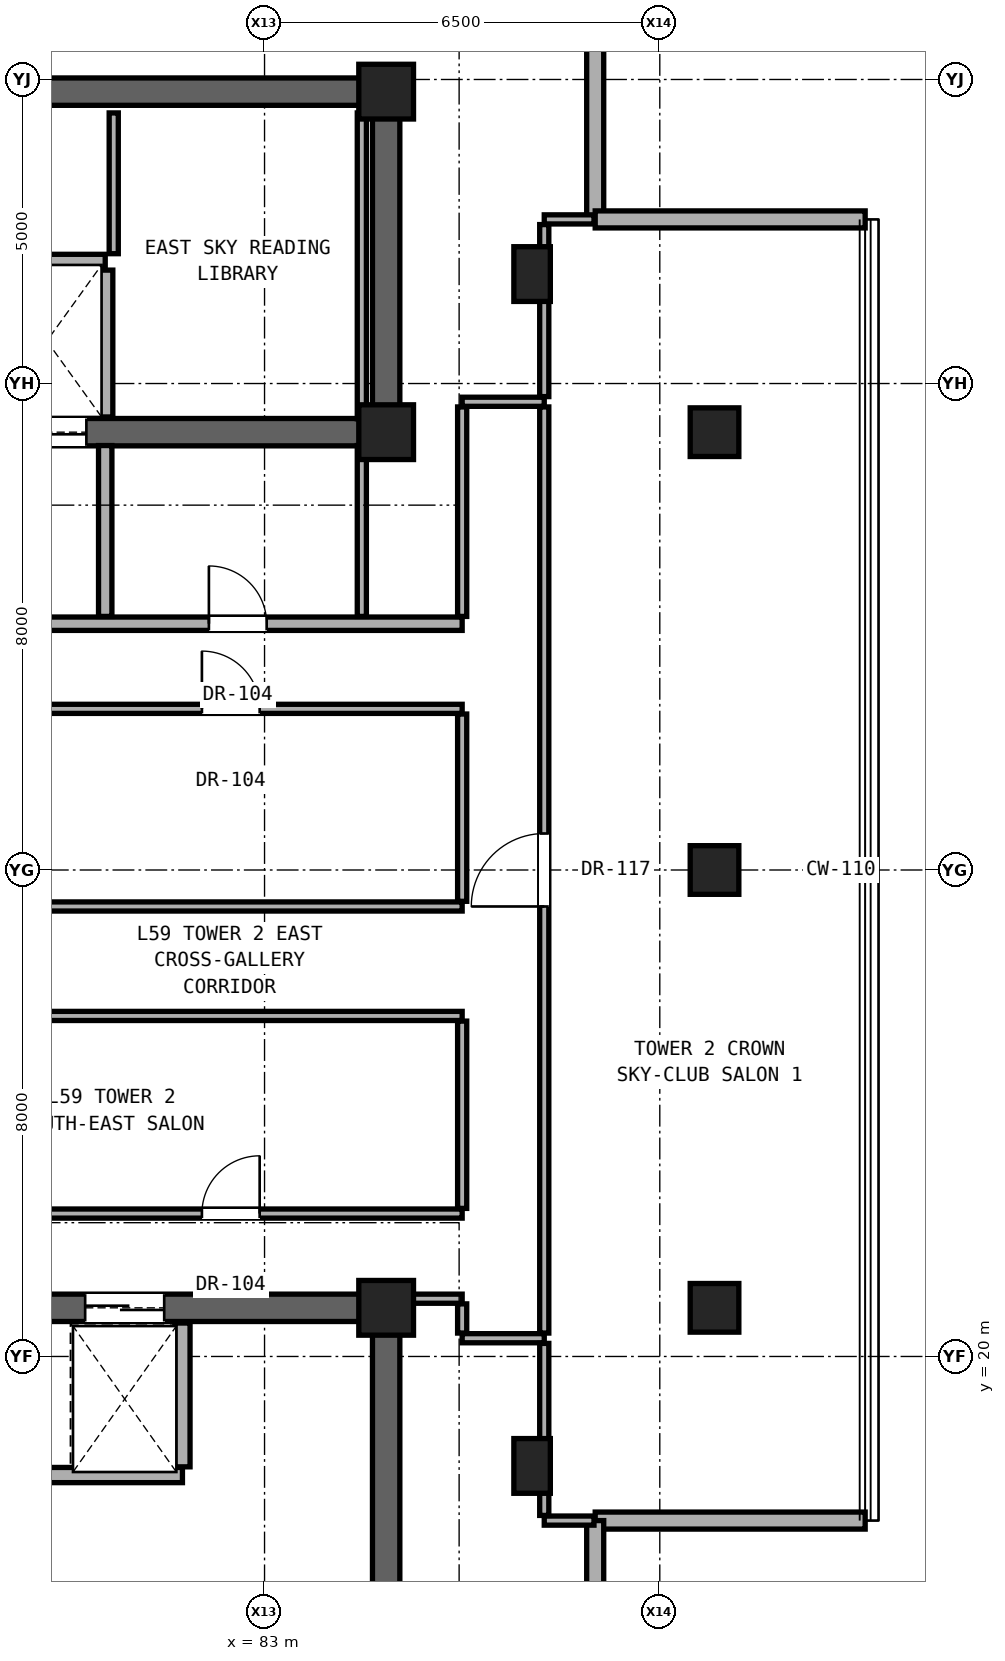
"""IFC4 building model, lengths in metres.
Left out: names, types, materials, properties, quantities, classifications, styles, units other than length and angle.
Written with IfcOpenShell. Run it as: python <this file> out.ifc"""

import sys

from ifc_helpers import new_model, si_unit, direction, frame, frame_2d, origin, origin_2d, place, context, subcontext, project, spatial, rectangle, hollow_rectangle, extrude, element, fill, save


model = new_model("IFC4")
c1 = context("Model", 3, precision=1e-05, world=origin(), true_north=direction((0.0, 1.0)))
c2 = subcontext(c1, "Body", "Model", "MODEL_VIEW")
j1 = project(units=[si_unit("LENGTHUNIT", "METRE"), si_unit("PLANEANGLEUNIT", "RADIAN")], contexts=[c1])
p1 = place(None, origin())
s1 = spatial("IfcSite", under=j1, at=p1, CompositionType="ELEMENT")
p2 = place(p1, origin())
s2 = spatial("IfcBuilding", under=s1, at=p2, CompositionType="ELEMENT")
p3 = place(p2, frame((0.0, 0.0, 206.4)))
s3 = spatial("IfcBuildingStorey", under=s2, at=p3, CompositionType="ELEMENT", Elevation=206.4)
for number, where, z_axis, x_axis in (
    (1, (85.0, 20.8, 0.0), (0.0, 0.0, 1.0), (1.0, 0.0, 0.0)),
    (2, (85.0, 35.2, 0.0), (0.0, 0.0, 1.0), (1.0, 0.0, 0.0)),
    (3, (85.0, 40.8, 0.0), (0.0, 0.0, 1.0), (1.0, 0.0, 0.0)),
):
    element("IfcColumn", number, at=place(p3, frame(where, z_axis=z_axis, x_axis=x_axis)), inside=s3, PredefinedType="COLUMN", context=c2, shape_type="SweptSolid", body=[
        extrude(rectangle(XDim=0.9, YDim=0.9, at=origin_2d()), origin(), (0.0, 0.0, 1.0), 3.25),
    ])
for number, where, z_axis, x_axis in (
    (4, (90.4, 20.8, 0.0), (0.0, 0.0, 1.0), (1.0, 0.0, 0.0)),
    (5, (90.4, 28.0, 0.0), (0.0, 0.0, 1.0), (1.0, 0.0, 0.0)),
    (6, (90.4, 35.2, 0.0), (0.0, 0.0, 1.0), (1.0, 0.0, 0.0)),
):
    element("IfcColumn", number, at=place(p3, frame(where, z_axis=z_axis, x_axis=x_axis)), inside=s3, PredefinedType="COLUMN", context=c2, shape_type="SweptSolid", body=[
        extrude(hollow_rectangle(XDim=0.8, YDim=0.8, WallThickness=0.045, at=origin_2d()), origin(), (0.0, 0.0, 1.0), 3.25),
    ])
for number, where, z_axis, x_axis in (
    (7, (87.4, 18.2, 0.0), (0.0, 0.0, 1.0), (1.0, 0.0, 0.0)),
    (8, (87.4, 37.8, 0.0), (0.0, 0.0, 1.0), (1.0, 0.0, 0.0)),
):
    element("IfcColumn", number, at=place(p3, frame(where, z_axis=z_axis, x_axis=x_axis)), inside=s3, PredefinedType="PILASTER", context=c2, shape_type="SweptSolid", body=[
        extrude(rectangle(XDim=0.6, YDim=0.9, at=origin_2d()), origin(), (0.0, 0.0, 1.0), 3.25),
    ])
p4 = place(p3, frame((68.0, 40.8, 0.0), z_axis=(0.0, 0.0, 1.0), x_axis=(1.0, 0.0, 0.0)))
e9 = element("IfcWall", 9, at=p4, inside=s3, PredefinedType="SHEAR", context=c2, shape_type="SweptSolid", body=[
    extrude(rectangle(XDim=17.0, YDim=0.45, at=frame_2d((8.5, 0.0))), origin(), (0.0, 0.0, 1.0), 2.6),
])
p5 = place(p3, frame((85.0, 35.2, 0.0), z_axis=(0.0, 0.0, 1.0), x_axis=(0.0, 1.0, 0.0)))
e10 = element("IfcWall", 10, at=p5, inside=s3, PredefinedType="SHEAR", context=c2, shape_type="SweptSolid", body=[
    extrude(rectangle(XDim=5.6, YDim=0.45, at=frame_2d((2.8, 0.0))), origin(), (0.0, 0.0, 1.0), 2.6),
])
p6 = place(p3, frame((68.0, 35.2, 0.0), z_axis=(0.0, 0.0, 1.0), x_axis=(1.0, 0.0, 0.0)))
e11 = element("IfcWall", 11, at=p6, inside=s3, PredefinedType="SHEAR", context=c2, shape_type="SweptSolid", body=[
    extrude(rectangle(XDim=17.0, YDim=0.45, at=frame_2d((8.5, 0.0))), origin(), (0.0, 0.0, 1.0), 2.6),
])
p7 = place(p6, frame((1.06, 0.0, 0.0)))
e12 = element("IfcOpeningElement", 12, at=p7, cuts=e11, PredefinedType="OPENING", context=c2, shape_type="SweptSolid", body=[
    extrude(rectangle(XDim=1.15, YDim=2.2, at=frame_2d((0.575, 1.1))), frame((0.0, 0.235, 0.0), z_axis=(0.0, -1.0, 0.0), x_axis=(1.0, 0.0, 0.0)), (0.0, 0.0, 1.0), 0.47),
])
p8 = place(p6, frame((8.75, 0.0, 0.0)))
e13 = element("IfcOpeningElement", 13, at=p8, cuts=e11, PredefinedType="OPENING", context=c2, shape_type="SweptSolid", body=[
    extrude(rectangle(XDim=1.4, YDim=2.35, at=frame_2d((0.7, 1.175))), frame((0.0, 0.235, 0.0), z_axis=(0.0, -1.0, 0.0), x_axis=(1.0, 0.0, 0.0)), (0.0, 0.0, 1.0), 0.47),
])
p9 = place(p6, frame((10.77, 0.0, 0.0)))
e14 = element("IfcOpeningElement", 14, at=p9, cuts=e11, PredefinedType="OPENING", context=c2, shape_type="SweptSolid", body=[
    extrude(rectangle(XDim=1.3, YDim=2.3, at=frame_2d((0.65, 1.15))), frame((0.0, 0.235, 0.0), z_axis=(0.0, -1.0, 0.0), x_axis=(1.0, 0.0, 0.0)), (0.0, 0.0, 1.0), 0.47),
])
p10 = place(p3, frame((85.0, 15.2, 0.0), z_axis=(0.0, 0.0, 1.0), x_axis=(0.0, 1.0, 0.0)))
e15 = element("IfcWall", 15, at=p10, inside=s3, PredefinedType="SHEAR", context=c2, shape_type="SweptSolid", body=[
    extrude(rectangle(XDim=5.6, YDim=0.45, at=frame_2d((2.8, 0.0))), origin(), (0.0, 0.0, 1.0), 2.6),
])
p11 = place(p3, frame((68.0, 20.8, 0.0), z_axis=(0.0, 0.0, 1.0), x_axis=(1.0, 0.0, 0.0)))
e16 = element("IfcWall", 16, at=p11, inside=s3, PredefinedType="SHEAR", context=c2, shape_type="SweptSolid", body=[
    extrude(rectangle(XDim=17.0, YDim=0.45, at=frame_2d((8.5, 0.0))), origin(), (0.0, 0.0, 1.0), 2.6),
])
p12 = place(p11, frame((4.145, 0.0, 0.0)))
e17 = element("IfcOpeningElement", 17, at=p12, cuts=e16, PredefinedType="OPENING", context=c2, shape_type="SweptSolid", body=[
    extrude(rectangle(XDim=1.2, YDim=2.25, at=frame_2d((0.6, 1.125))), frame((0.0, 0.235, 0.0), z_axis=(0.0, -1.0, 0.0), x_axis=(1.0, 0.0, 0.0)), (0.0, 0.0, 1.0), 0.47),
])
p13 = place(p11, frame((9.55, 0.0, 0.0)))
e18 = element("IfcOpeningElement", 18, at=p13, cuts=e16, PredefinedType="OPENING", context=c2, shape_type="SweptSolid", body=[
    extrude(rectangle(XDim=1.3, YDim=2.3, at=frame_2d((0.65, 1.15))), frame((0.0, 0.235, 0.0), z_axis=(0.0, -1.0, 0.0), x_axis=(1.0, 0.0, 0.0)), (0.0, 0.0, 1.0), 0.47),
])
p14 = place(p11, frame((12.05, 0.0, 0.0)))
e19 = element("IfcOpeningElement", 19, at=p14, cuts=e16, PredefinedType="OPENING", context=c2, shape_type="SweptSolid", body=[
    extrude(rectangle(XDim=1.3, YDim=2.3, at=frame_2d((0.65, 1.15))), frame((0.0, 0.235, 0.0), z_axis=(0.0, -1.0, 0.0), x_axis=(1.0, 0.0, 0.0)), (0.0, 0.0, 1.0), 0.47),
])
for number, where, z_axis, x_axis in (
    (20, (88.438, 38.699, 0.0), (0.0, 0.0, 1.0), (0.0, 1.0, 0.0)),
    (21, (88.438, 17.301, 0.0), (0.0, 0.0, 1.0), (1.0, 0.0, 0.0)),
    (22, (88.438, 12.862, 0.0), (0.0, 0.0, 1.0), (0.0, 1.0, 0.0)),
    (23, (92.877, 38.699, 0.0), (0.0, 0.0, 1.0), (-1.0, 0.0, 0.0)),
):
    element("IfcWall", number, at=place(p3, frame(where, z_axis=z_axis, x_axis=x_axis)), inside=s3, PredefinedType="SOLIDWALL", context=c2, shape_type="SweptSolid", body=[
        extrude(rectangle(XDim=4.44, YDim=0.28, at=frame_2d((2.22, 0.0))), origin(), (0.0, 0.0, 1.0), 2.58),
    ])
p15 = place(p3, frame((87.6, 17.301, 0.0), z_axis=(0.0, 0.0, 1.0), x_axis=(1.0, 0.0, 0.0)))
e24 = element("IfcWall", 24, at=p15, inside=s3, PredefinedType="PARTITIONING", context=c2, shape_type="SweptSolid", body=[
    extrude(rectangle(XDim=0.818, YDim=0.15, at=frame_2d((0.409, 0.0))), origin(), (0.0, 0.0, 1.0), 2.6),
])
p16 = place(p3, frame((77.3, 18.05, 0.0), z_axis=(0.0, 0.0, 1.0), x_axis=(1.0, 0.0, 0.0)))
e25 = element("IfcWall", 25, at=p16, inside=s3, PredefinedType="SOLIDWALL", context=c2, shape_type="SweptSolid", body=[
    extrude(rectangle(XDim=4.35, YDim=0.25, at=frame_2d((2.175, 0.0))), origin(), (0.0, 0.0, 1.0), 2.6),
])
p17 = place(p3, frame((86.25, 20.3, 0.0), z_axis=(0.0, 0.0, 1.0), x_axis=(1.0, 0.0, 0.0)))
e26 = element("IfcWall", 26, at=p17, inside=s3, PredefinedType="PARTITIONING", context=c2, shape_type="SweptSolid", body=[
    extrude(rectangle(XDim=1.35, YDim=0.15, at=frame_2d((0.675, 0.0))), origin(), (0.0, 0.0, 1.0), 2.6),
])
p18 = place(p3, frame((85.22, 20.95, 0.0), z_axis=(0.0, 0.0, 1.0), x_axis=(1.0, 0.0, 0.0)))
e27 = element("IfcWall", 27, at=p18, inside=s3, PredefinedType="PARTITIONING", context=c2, shape_type="SweptSolid", body=[
    extrude(rectangle(XDim=1.03, YDim=0.15, at=frame_2d((0.515, 0.0))), origin(), (0.0, 0.0, 1.0), 2.262),
])
p19 = place(p3, frame((78.64, 22.35, 0.0), z_axis=(0.0, 0.0, 1.0), x_axis=(1.0, 0.0, 0.0)))
e28 = element("IfcWall", 28, at=p19, inside=s3, PredefinedType="PARTITIONING", context=c2, shape_type="SweptSolid", body=[
    extrude(rectangle(XDim=7.61, YDim=0.15, at=frame_2d((3.805, 0.0))), origin(), (0.0, 0.0, 1.0), 2.175),
])
p20 = place(p19, frame((3.33, 0.0, 0.0)))
e29 = element("IfcOpeningElement", 29, at=p20, cuts=e28, PredefinedType="OPENING", context=c2, shape_type="SweptSolid", body=[
    extrude(rectangle(XDim=0.95, YDim=2.15, at=frame_2d((0.475, 1.075))), frame((0.0, 0.085, 0.0), z_axis=(0.0, -1.0, 0.0), x_axis=(1.0, 0.0, 0.0)), (0.0, 0.0, 1.0), 0.17),
])
for number, where, z_axis, x_axis in (
    (30, (78.6, 25.6, 0.0), (0.0, 0.0, 1.0), (1.0, 0.0, 0.0)),
    (31, (78.6, 27.4, 0.0), (0.0, 0.0, 1.0), (1.0, 0.0, 0.0)),
):
    element("IfcWall", number, at=place(p3, frame(where, z_axis=z_axis, x_axis=x_axis)), inside=s3, PredefinedType="PARTITIONING", context=c2, shape_type="SweptSolid", body=[
        extrude(rectangle(XDim=7.65, YDim=0.15, at=frame_2d((3.825, 0.0))), origin(), (0.0, 0.0, 1.0), 2.175),
    ])
p21 = place(p3, frame((78.64, 30.65, 0.0), z_axis=(0.0, 0.0, 1.0), x_axis=(1.0, 0.0, 0.0)))
e32 = element("IfcWall", 32, at=p21, inside=s3, PredefinedType="PARTITIONING", context=c2, shape_type="SweptSolid", body=[
    extrude(rectangle(XDim=7.61, YDim=0.15, at=frame_2d((3.805, 0.0))), origin(), (0.0, 0.0, 1.0), 2.175),
])
p22 = place(p21, frame((3.33, 0.0, 0.0)))
e33 = element("IfcOpeningElement", 33, at=p22, cuts=e32, PredefinedType="OPENING", context=c2, shape_type="SweptSolid", body=[
    extrude(rectangle(XDim=0.95, YDim=2.15, at=frame_2d((0.475, 1.075))), frame((0.0, 0.085, 0.0), z_axis=(0.0, -1.0, 0.0), x_axis=(1.0, 0.0, 0.0)), (0.0, 0.0, 1.0), 0.17),
])
p23 = place(p3, frame((71.55, 32.05, 0.0), z_axis=(0.0, 0.0, 1.0), x_axis=(1.0, 0.0, 0.0)))
e34 = element("IfcWall", 34, at=p23, inside=s3, PredefinedType="SOLIDWALL", context=c2, shape_type="SweptSolid", body=[
    extrude(rectangle(XDim=14.7, YDim=0.22, at=frame_2d((7.35, 0.0))), origin(), (0.0, 0.0, 1.0), 2.175),
])
p24 = place(p23, frame((6.065, 0.0, 0.0)))
e35 = element("IfcOpeningElement", 35, at=p24, cuts=e34, PredefinedType="OPENING", context=c2, shape_type="SweptSolid", body=[
    extrude(rectangle(XDim=0.85, YDim=2.01, at=frame_2d((0.425, 1.005))), frame((0.0, 0.12, 0.0), z_axis=(0.0, -1.0, 0.0), x_axis=(1.0, 0.0, 0.0)), (0.0, 0.0, 1.0), 0.24),
])
p25 = place(p23, frame((10.535, 0.0, 0.0)))
e36 = element("IfcOpeningElement", 36, at=p25, cuts=e34, PredefinedType="OPENING", context=c2, shape_type="SweptSolid", body=[
    extrude(rectangle(XDim=0.95, YDim=2.15, at=frame_2d((0.475, 1.075))), frame((0.0, 0.12, 0.0), z_axis=(0.0, -1.0, 0.0), x_axis=(1.0, 0.0, 0.0)), (0.0, 0.0, 1.0), 0.24),
])
p26 = place(p23, frame((1.65, 0.0, 0.0)))
e37 = element("IfcOpeningElement", 37, at=p26, cuts=e34, PredefinedType="OPENING", context=c2, shape_type="SweptSolid", body=[
    extrude(rectangle(XDim=0.85, YDim=2.01, at=frame_2d((0.425, 1.005))), frame((0.0, 0.12, 0.0), z_axis=(0.0, -1.0, 0.0), x_axis=(1.0, 0.0, 0.0)), (0.0, 0.0, 1.0), 0.24),
])
p27 = place(p3, frame((86.25, 35.7, 0.0), z_axis=(0.0, 0.0, 1.0), x_axis=(1.0, 0.0, 0.0)))
e38 = element("IfcWall", 38, at=p27, inside=s3, PredefinedType="PARTITIONING", context=c2, shape_type="SweptSolid", body=[
    extrude(rectangle(XDim=1.35, YDim=0.15, at=frame_2d((0.675, 0.0))), origin(), (0.0, 0.0, 1.0), 2.6),
])
p28 = place(p3, frame((76.72, 38.0, 0.0), z_axis=(0.0, 0.0, 1.0), x_axis=(1.0, 0.0, 0.0)))
e39 = element("IfcWall", 39, at=p28, inside=s3, PredefinedType="SOLIDWALL", context=c2, shape_type="SweptSolid", body=[
    extrude(rectangle(XDim=3.66, YDim=0.25, at=frame_2d((1.83, 0.0))), origin(), (0.0, 0.0, 1.0), 2.6),
])
p29 = place(p3, frame((87.6, 38.699, 0.0), z_axis=(0.0, 0.0, 1.0), x_axis=(1.0, 0.0, 0.0)))
e40 = element("IfcWall", 40, at=p29, inside=s3, PredefinedType="PARTITIONING", context=c2, shape_type="SweptSolid", body=[
    extrude(rectangle(XDim=0.818, YDim=0.15, at=frame_2d((0.409, 0.0))), origin(), (0.0, 0.0, 1.0), 2.6),
])
p30 = place(p3, frame((80.38, 32.17, 0.0), z_axis=(0.0, 0.0, 1.0), x_axis=(0.0, 1.0, 0.0)))
e41 = element("IfcWall", 41, at=p30, inside=s3, PredefinedType="SOLIDWALL", context=c2, shape_type="SweptSolid", body=[
    extrude(rectangle(XDim=2.81, YDim=0.22, at=frame_2d((1.405, 0.0))), origin(), (0.0, 0.0, 1.0), 2.6),
])
p31 = place(p3, frame((80.38, 35.45, 0.0), z_axis=(0.0, 0.0, 1.0), x_axis=(0.0, 1.0, 0.0)))
e42 = element("IfcWall", 42, at=p31, inside=s3, PredefinedType="SOLIDWALL", context=c2, shape_type="SweptSolid", body=[
    extrude(rectangle(XDim=2.415, YDim=0.25, at=frame_2d((1.208, 0.0))), origin(), (0.0, 0.0, 1.0), 2.6),
])
p32 = place(p3, frame((80.52, 38.135, 0.0), z_axis=(0.0, 0.0, 1.0), x_axis=(0.0, 1.0, 0.0)))
e43 = element("IfcWall", 43, at=p32, inside=s3, PredefinedType="PARTITIONING", context=c2, shape_type="SweptSolid", body=[
    extrude(rectangle(XDim=2.315, YDim=0.15, at=frame_2d((1.157, 0.0))), origin(), (0.0, 0.0, 1.0), 2.6),
])
p33 = place(p3, frame((81.65, 18.185, 0.0), z_axis=(0.0, 0.0, 1.0), x_axis=(0.0, 1.0, 0.0)))
e44 = element("IfcWall", 44, at=p33, inside=s3, PredefinedType="SOLIDWALL", context=c2, shape_type="SweptSolid", body=[
    extrude(rectangle(XDim=2.365, YDim=0.25, at=frame_2d((1.183, 0.0))), origin(), (0.0, 0.0, 1.0), 2.6),
])
p34 = place(p3, frame((84.6, 32.17, 0.0), z_axis=(0.0, 0.0, 1.0), x_axis=(0.0, 1.0, 0.0)))
e45 = element("IfcWall", 45, at=p34, inside=s3, PredefinedType="PARTITIONING", context=c2, shape_type="SweptSolid", body=[
    extrude(rectangle(XDim=2.81, YDim=0.15, at=frame_2d((1.405, 0.0))), origin(), (0.0, 0.0, 1.0), 2.6),
])
p35 = place(p3, frame((84.6, 35.42, 0.0), z_axis=(0.0, 0.0, 1.0), x_axis=(0.0, 1.0, 0.0)))
e46 = element("IfcWall", 46, at=p35, inside=s3, PredefinedType="PARTITIONING", context=c2, shape_type="SweptSolid", body=[
    extrude(rectangle(XDim=5.03, YDim=0.15, at=frame_2d((2.515, 0.0))), origin(), (0.0, 0.0, 1.0), 2.6),
])
p36 = place(p3, frame((86.25, 20.385, 0.0), z_axis=(0.0, 0.0, 1.0), x_axis=(0.0, 1.0, 0.0)))
e47 = element("IfcWall", 47, at=p36, inside=s3, PredefinedType="PARTITIONING", context=c2, shape_type="SweptSolid", body=[
    extrude(rectangle(XDim=0.48, YDim=0.15, at=frame_2d((0.24, 0.0))), origin(), (0.0, 0.0, 1.0), 2.262),
])
p37 = place(p3, frame((86.25, 22.435, 0.0), z_axis=(0.0, 0.0, 1.0), x_axis=(0.0, 1.0, 0.0)))
e48 = element("IfcWall", 48, at=p37, inside=s3, PredefinedType="PARTITIONING", context=c2, shape_type="SweptSolid", body=[
    extrude(rectangle(XDim=3.08, YDim=0.15, at=frame_2d((1.54, 0.0))), origin(), (0.0, 0.0, 1.0), 2.6),
])
p38 = place(p3, frame((86.25, 27.485, 0.0), z_axis=(0.0, 0.0, 1.0), x_axis=(0.0, 1.0, 0.0)))
e49 = element("IfcWall", 49, at=p38, inside=s3, PredefinedType="PARTITIONING", context=c2, shape_type="SweptSolid", body=[
    extrude(rectangle(XDim=3.08, YDim=0.15, at=frame_2d((1.54, 0.0))), origin(), (0.0, 0.0, 1.0), 2.262),
])
p39 = place(p3, frame((86.25, 32.17, 0.0), z_axis=(0.0, 0.0, 1.0), x_axis=(0.0, 1.0, 0.0)))
e50 = element("IfcWall", 50, at=p39, inside=s3, PredefinedType="PARTITIONING", context=c2, shape_type="SweptSolid", body=[
    extrude(rectangle(XDim=3.445, YDim=0.15, at=frame_2d((1.723, 0.0))), origin(), (0.0, 0.0, 1.0), 2.262),
])
p40 = place(p3, frame((87.6, 17.386, 0.0), z_axis=(0.0, 0.0, 1.0), x_axis=(0.0, 1.0, 0.0)))
e51 = element("IfcWall", 51, at=p40, inside=s3, PredefinedType="PARTITIONING", context=c2, shape_type="SweptSolid", body=[
    extrude(rectangle(XDim=2.829, YDim=0.15, at=frame_2d((1.415, 0.0))), origin(), (0.0, 0.0, 1.0), 2.043),
])
p41 = place(p3, frame((87.6, 20.385, 0.0), z_axis=(0.0, 0.0, 1.0), x_axis=(0.0, 1.0, 0.0)))
e52 = element("IfcWall", 52, at=p41, inside=s3, PredefinedType="PARTITIONING", context=c2, shape_type="SweptSolid", body=[
    extrude(rectangle(XDim=15.23, YDim=0.15, at=frame_2d((7.615, 0.0))), origin(), (0.0, 0.0, 1.0), 2.262),
])
p42 = place(p41, frame((7.015, 0.0, 0.0)))
e53 = element("IfcOpeningElement", 53, at=p42, cuts=e52, PredefinedType="OPENING", context=c2, shape_type="SweptSolid", body=[
    extrude(rectangle(XDim=1.2, YDim=2.25, at=frame_2d((0.6, 1.125))), frame((0.0, 0.085, 0.0), z_axis=(0.0, -1.0, 0.0), x_axis=(1.0, 0.0, 0.0)), (0.0, 0.0, 1.0), 0.17),
])
p43 = place(p3, frame((87.6, 35.785, 0.0), z_axis=(0.0, 0.0, 1.0), x_axis=(0.0, 1.0, 0.0)))
e54 = element("IfcWall", 54, at=p43, inside=s3, PredefinedType="PARTITIONING", context=c2, shape_type="SweptSolid", body=[
    extrude(rectangle(XDim=2.829, YDim=0.15, at=frame_2d((1.415, 0.0))), origin(), (0.0, 0.0, 1.0), 2.043),
])
p44 = place(p25, origin())
e55 = element("IfcDoor", 55, at=p44, inside=s3, OperationType="SINGLE_SWING_LEFT", PredefinedType="DOOR", context=c2, shape_type="SweptSolid", body=[
    extrude(rectangle(XDim=0.95, YDim=2.15, at=frame_2d((0.475, 1.075))), frame((0.0, 0.025, 0.0), z_axis=(0.0, -1.0, 0.0), x_axis=(1.0, 0.0, 0.0)), (0.0, 0.0, 1.0), 0.05),
])
fill(e36, e55)
p45 = place(p42, origin())
e56 = element("IfcDoor", 56, at=p45, inside=s3, OperationType="SINGLE_SWING_LEFT", PredefinedType="DOOR", context=c2, shape_type="SweptSolid", body=[
    extrude(rectangle(XDim=1.2, YDim=2.25, at=frame_2d((0.6, 1.125))), frame((0.0, 0.025, 0.0), z_axis=(0.0, -1.0, 0.0), x_axis=(1.0, 0.0, 0.0)), (0.0, 0.0, 1.0), 0.05),
])
fill(e53, e56)
p46 = place(p20, origin())
e57 = element("IfcDoor", 57, at=p46, inside=s3, OperationType="SINGLE_SWING_RIGHT", PredefinedType="DOOR", context=c2, shape_type="SweptSolid", body=[
    extrude(rectangle(XDim=0.95, YDim=2.15, at=frame_2d((0.475, 1.075))), frame((0.0, 0.025, 0.0), z_axis=(0.0, -1.0, 0.0), x_axis=(1.0, 0.0, 0.0)), (0.0, 0.0, 1.0), 0.05),
])
fill(e29, e57)
p47 = place(p22, origin())
e58 = element("IfcDoor", 58, at=p47, inside=s3, OperationType="SINGLE_SWING_LEFT", PredefinedType="DOOR", context=c2, shape_type="SweptSolid", body=[
    extrude(rectangle(XDim=0.95, YDim=2.15, at=frame_2d((0.475, 1.075))), frame((0.0, 0.025, 0.0), z_axis=(0.0, -1.0, 0.0), x_axis=(1.0, 0.0, 0.0)), (0.0, 0.0, 1.0), 0.05),
])
fill(e33, e58)
p48 = place(p9, origin())
e59 = element("IfcDoor", 59, at=p48, inside=s3, OperationType="DOUBLE_DOOR_SLIDING", PredefinedType="DOOR", context=c2, shape_type="SweptSolid", body=[
    extrude(rectangle(XDim=1.3, YDim=2.3, at=frame_2d((0.65, 1.15))), frame((0.0, 0.025, 0.0), z_axis=(0.0, -1.0, 0.0), x_axis=(1.0, 0.0, 0.0)), (0.0, 0.0, 1.0), 0.05),
])
fill(e14, e59)
p49 = place(p14, origin())
e60 = element("IfcDoor", 60, at=p49, inside=s3, OperationType="DOUBLE_DOOR_SLIDING", PredefinedType="DOOR", context=c2, shape_type="SweptSolid", body=[
    extrude(rectangle(XDim=1.3, YDim=2.3, at=frame_2d((0.65, 1.15))), frame((0.0, 0.025, 0.0), z_axis=(0.0, -1.0, 0.0), x_axis=(1.0, 0.0, 0.0)), (0.0, 0.0, 1.0), 0.05),
])
fill(e19, e60)
save(model, sys.argv[1])
